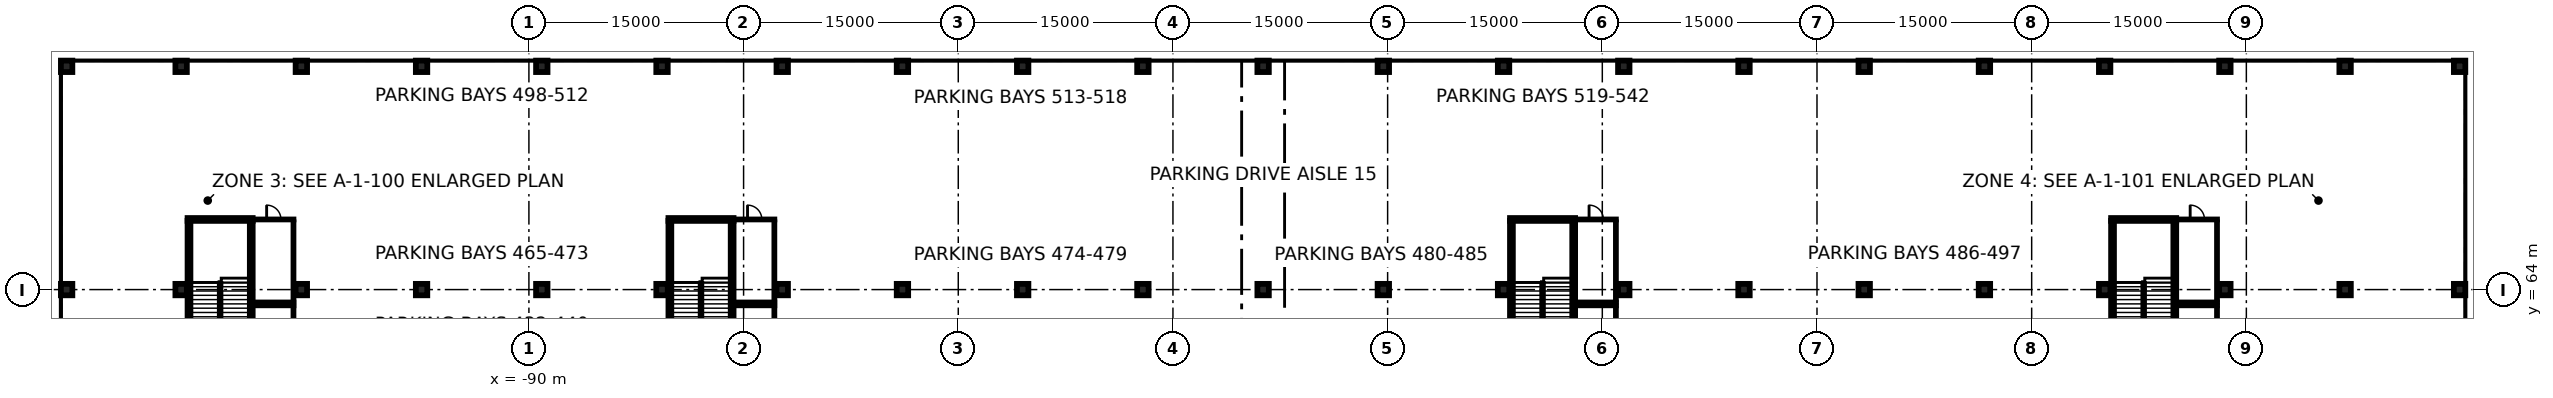
"""IFC4 building model, lengths in metres.
Left out: names, types, materials, properties, quantities, classifications, styles, units other than length and angle.
Written with IfcOpenShell. Run it as: python <this file> out.ifc"""

import sys

from ifc_helpers import new_model, si_unit, direction, frame, frame_2d, origin, origin_2d, place, context, subcontext, project, spatial, rectangle, extrude, element, fill, save


model = new_model("IFC4")
c1 = context("Model", 3, precision=1e-05, world=origin(), true_north=direction((0.0, 1.0)))
c2 = subcontext(c1, "Body", "Model", "MODEL_VIEW")
j1 = project(units=[si_unit("LENGTHUNIT", "METRE"), si_unit("PLANEANGLEUNIT", "RADIAN")], contexts=[c1])
p1 = place(None, origin())
s1 = spatial("IfcSite", under=j1, at=p1, CompositionType="ELEMENT")
p2 = place(p1, origin())
s2 = spatial("IfcBuilding", under=s1, at=p2, CompositionType="ELEMENT")
p3 = place(p2, frame((0.0, 0.0, -12.0)))
s3 = spatial("IfcBuildingStorey", under=s2, at=p3, CompositionType="ELEMENT", Elevation=-12.0)
p4 = place(p3, frame((-123.6, 80.45, 0.0), z_axis=(0.0, 0.0, 1.0), x_axis=(1.0, 0.0, 0.0)))
e1 = element("IfcWall", 1, at=p4, inside=s3, PredefinedType="USERDEFINED", context=c2, shape_type="SweptSolid", body=[
    extrude(rectangle(XDim=169.8, YDim=0.9, at=frame_2d((84.9, 0.0))), origin(), (0.0, 0.0, 1.0), 11.55),
])
for number, where, z_axis, x_axis in (
    (2, (-123.15, -80.0, 0.0), (0.0, 0.0, 1.0), (0.0, 1.0, 0.0)),
    (3, (45.75, -80.0, 0.0), (0.0, 0.0, 1.0), (0.0, 1.0, 0.0)),
):
    element("IfcWall", number, at=place(p3, frame(where, z_axis=z_axis, x_axis=x_axis)), inside=s3, PredefinedType="USERDEFINED", context=c2, shape_type="SweptSolid", body=[
        extrude(rectangle(XDim=160.0, YDim=0.9, at=frame_2d((80.0, 0.0))), origin(), (0.0, 0.0, 1.0), 11.55),
    ])
p5 = place(p2, frame((0.0, 0.0, -3.6)))
s4 = spatial("IfcBuildingStorey", under=s2, at=p5, CompositionType="ELEMENT", Elevation=-3.6)
for number, where, z_axis, x_axis in (
    (4, (-122.3, 64.0, -0.4), (0.0, 0.0, 1.0), (1.0, 0.0, 0.0)),
    (5, (-122.3, 79.6, -0.4), (0.0, 0.0, 1.0), (1.0, 0.0, 0.0)),
    (6, (-114.3, 64.0, -0.4), (0.0, 0.0, 1.0), (1.0, 0.0, 0.0)),
    (7, (-114.3, 79.6, -0.4), (0.0, 0.0, 1.0), (1.0, 0.0, 0.0)),
    (8, (-105.9, 64.0, -0.4), (0.0, 0.0, 1.0), (1.0, 0.0, 0.0)),
    (9, (-105.9, 79.6, -0.4), (0.0, 0.0, 1.0), (1.0, 0.0, 0.0)),
    (10, (-97.5, 64.0, -0.4), (0.0, 0.0, 1.0), (1.0, 0.0, 0.0)),
    (11, (-97.5, 79.6, -0.4), (0.0, 0.0, 1.0), (1.0, 0.0, 0.0)),
    (12, (-89.1, 64.0, -0.4), (0.0, 0.0, 1.0), (1.0, 0.0, 0.0)),
    (13, (-89.1, 79.6, -0.4), (0.0, 0.0, 1.0), (1.0, 0.0, 0.0)),
    (14, (-80.7, 64.0, -0.4), (0.0, 0.0, 1.0), (1.0, 0.0, 0.0)),
    (15, (-80.7, 79.6, -0.4), (0.0, 0.0, 1.0), (1.0, 0.0, 0.0)),
    (16, (-72.3, 64.0, -0.4), (0.0, 0.0, 1.0), (1.0, 0.0, 0.0)),
    (17, (-72.3, 79.6, -0.4), (0.0, 0.0, 1.0), (1.0, 0.0, 0.0)),
    (18, (-63.9, 64.0, -0.4), (0.0, 0.0, 1.0), (1.0, 0.0, 0.0)),
    (19, (-63.9, 79.6, -0.4), (0.0, 0.0, 1.0), (1.0, 0.0, 0.0)),
    (20, (-55.5, 64.0, -0.4), (0.0, 0.0, 1.0), (1.0, 0.0, 0.0)),
    (21, (-55.5, 79.6, -0.4), (0.0, 0.0, 1.0), (1.0, 0.0, 0.0)),
    (22, (-47.1, 64.0, -0.4), (0.0, 0.0, 1.0), (1.0, 0.0, 0.0)),
    (23, (-47.1, 79.6, -0.4), (0.0, 0.0, 1.0), (1.0, 0.0, 0.0)),
    (24, (-38.7, 64.0, -0.4), (0.0, 0.0, 1.0), (1.0, 0.0, 0.0)),
    (25, (-38.7, 79.6, -0.4), (0.0, 0.0, 1.0), (1.0, 0.0, 0.0)),
    (26, (-30.3, 64.0, -0.4), (0.0, 0.0, 1.0), (1.0, 0.0, 0.0)),
    (27, (-30.3, 79.6, -0.4), (0.0, 0.0, 1.0), (1.0, 0.0, 0.0)),
    (28, (-21.9, 64.0, -0.4), (0.0, 0.0, 1.0), (1.0, 0.0, 0.0)),
    (29, (-21.9, 79.6, -0.4), (0.0, 0.0, 1.0), (1.0, 0.0, 0.0)),
    (30, (-13.5, 64.0, -0.4), (0.0, 0.0, 1.0), (1.0, 0.0, 0.0)),
    (31, (-13.5, 79.6, -0.4), (0.0, 0.0, 1.0), (1.0, 0.0, 0.0)),
    (32, (-5.1, 64.0, -0.4), (0.0, 0.0, 1.0), (1.0, 0.0, 0.0)),
    (33, (-5.1, 79.6, -0.4), (0.0, 0.0, 1.0), (1.0, 0.0, 0.0)),
    (34, (3.3, 64.0, -0.4), (0.0, 0.0, 1.0), (1.0, 0.0, 0.0)),
    (35, (3.3, 79.6, -0.4), (0.0, 0.0, 1.0), (1.0, 0.0, 0.0)),
    (36, (11.7, 64.0, -0.4), (0.0, 0.0, 1.0), (1.0, 0.0, 0.0)),
    (37, (11.7, 79.6, -0.4), (0.0, 0.0, 1.0), (1.0, 0.0, 0.0)),
    (38, (20.1, 64.0, -0.4), (0.0, 0.0, 1.0), (1.0, 0.0, 0.0)),
    (39, (20.1, 79.6, -0.4), (0.0, 0.0, 1.0), (1.0, 0.0, 0.0)),
    (40, (28.5, 64.0, -0.4), (0.0, 0.0, 1.0), (1.0, 0.0, 0.0)),
    (41, (28.5, 79.6, -0.4), (0.0, 0.0, 1.0), (1.0, 0.0, 0.0)),
    (42, (36.9, 64.0, -0.4), (0.0, 0.0, 1.0), (1.0, 0.0, 0.0)),
    (43, (36.9, 79.6, -0.4), (0.0, 0.0, 1.0), (1.0, 0.0, 0.0)),
    (44, (44.9, 64.0, -0.4), (0.0, 0.0, 1.0), (1.0, 0.0, 0.0)),
    (45, (44.9, 79.6, -0.4), (0.0, 0.0, 1.0), (1.0, 0.0, 0.0)),
):
    element("IfcColumn", number, at=place(p5, frame(where, z_axis=z_axis, x_axis=x_axis)), inside=s4, PredefinedType="COLUMN", context=c2, shape_type="SweptSolid", body=[
        extrude(rectangle(XDim=0.8, YDim=0.8, at=origin_2d()), origin(), (0.0, 0.0, 1.0), 3.55),
    ])
p6 = place(p5, frame((-109.3, 62.9, 0.0), z_axis=(0.0, 0.0, 1.0), x_axis=(1.0, 0.0, 0.0)))
e46 = element("IfcWall", 46, at=p6, inside=s4, PredefinedType="PARTITIONING", context=c2, shape_type="SweptSolid", body=[
    extrude(rectangle(XDim=2.95, YDim=0.2, at=frame_2d((1.475, 0.0))), origin(), (0.0, 0.0, 1.0), 3.15),
])
p7 = place(p5, frame((-106.45, 59.2, 0.0), z_axis=(0.0, 0.0, 1.0), x_axis=(0.0, 1.0, 0.0)))
e47 = element("IfcWall", 47, at=p7, inside=s4, PredefinedType="PARTITIONING", context=c2, shape_type="SweptSolid", body=[
    extrude(rectangle(XDim=3.6, YDim=0.2, at=frame_2d((1.8, 0.0))), origin(), (0.0, 0.0, 1.0), 3.15),
])
p8 = place(p5, frame((-109.3, 63.1, 0.0), z_axis=(0.0, 0.0, 1.0), x_axis=(1.0, 0.0, 0.0)))
e48 = element("IfcWall", 48, at=p8, inside=s4, PredefinedType="PARTITIONING", context=c2, shape_type="SweptSolid", body=[
    extrude(rectangle(XDim=2.95, YDim=0.2, at=frame_2d((1.475, 0.0))), origin(), (0.0, 0.0, 1.0), 3.15),
])
p9 = place(p5, frame((-109.3, 68.9, 0.0), z_axis=(0.0, 0.0, 1.0), x_axis=(1.0, 0.0, 0.0)))
e49 = element("IfcWall", 49, at=p9, inside=s4, PredefinedType="PARTITIONING", context=c2, shape_type="SweptSolid", body=[
    extrude(rectangle(XDim=2.95, YDim=0.2, at=frame_2d((1.475, 0.0))), origin(), (0.0, 0.0, 1.0), 3.15),
])
p10 = place(p9, frame((0.975, 0.0, 0.0)))
e50 = element("IfcOpeningElement", 50, at=p10, cuts=e49, PredefinedType="OPENING", context=c2, shape_type="SweptSolid", body=[
    extrude(rectangle(XDim=1.0, YDim=2.1, at=frame_2d((0.5, 1.05))), frame((0.0, 0.11, 0.0), z_axis=(0.0, -1.0, 0.0), x_axis=(1.0, 0.0, 0.0)), (0.0, 0.0, 1.0), 0.22),
])
p11 = place(p5, frame((-106.45, 63.2, 0.0), z_axis=(0.0, 0.0, 1.0), x_axis=(0.0, 1.0, 0.0)))
e51 = element("IfcWall", 51, at=p11, inside=s4, PredefinedType="PARTITIONING", context=c2, shape_type="SweptSolid", body=[
    extrude(rectangle(XDim=5.6, YDim=0.2, at=frame_2d((2.8, 0.0))), origin(), (0.0, 0.0, 1.0), 3.15),
])
p12 = place(p5, frame((-75.7, 62.9, 0.0), z_axis=(0.0, 0.0, 1.0), x_axis=(1.0, 0.0, 0.0)))
e52 = element("IfcWall", 52, at=p12, inside=s4, PredefinedType="PARTITIONING", context=c2, shape_type="SweptSolid", body=[
    extrude(rectangle(XDim=2.95, YDim=0.2, at=frame_2d((1.475, 0.0))), origin(), (0.0, 0.0, 1.0), 3.15),
])
p13 = place(p5, frame((-72.85, 59.2, 0.0), z_axis=(0.0, 0.0, 1.0), x_axis=(0.0, 1.0, 0.0)))
e53 = element("IfcWall", 53, at=p13, inside=s4, PredefinedType="PARTITIONING", context=c2, shape_type="SweptSolid", body=[
    extrude(rectangle(XDim=3.6, YDim=0.2, at=frame_2d((1.8, 0.0))), origin(), (0.0, 0.0, 1.0), 3.15),
])
p14 = place(p5, frame((-75.7, 63.1, 0.0), z_axis=(0.0, 0.0, 1.0), x_axis=(1.0, 0.0, 0.0)))
e54 = element("IfcWall", 54, at=p14, inside=s4, PredefinedType="PARTITIONING", context=c2, shape_type="SweptSolid", body=[
    extrude(rectangle(XDim=2.95, YDim=0.2, at=frame_2d((1.475, 0.0))), origin(), (0.0, 0.0, 1.0), 3.15),
])
p15 = place(p5, frame((-75.7, 68.9, 0.0), z_axis=(0.0, 0.0, 1.0), x_axis=(1.0, 0.0, 0.0)))
e55 = element("IfcWall", 55, at=p15, inside=s4, PredefinedType="PARTITIONING", context=c2, shape_type="SweptSolid", body=[
    extrude(rectangle(XDim=2.95, YDim=0.2, at=frame_2d((1.475, 0.0))), origin(), (0.0, 0.0, 1.0), 3.15),
])
p16 = place(p15, frame((0.975, 0.0, 0.0)))
e56 = element("IfcOpeningElement", 56, at=p16, cuts=e55, PredefinedType="OPENING", context=c2, shape_type="SweptSolid", body=[
    extrude(rectangle(XDim=1.0, YDim=2.1, at=frame_2d((0.5, 1.05))), frame((0.0, 0.11, 0.0), z_axis=(0.0, -1.0, 0.0), x_axis=(1.0, 0.0, 0.0)), (0.0, 0.0, 1.0), 0.22),
])
p17 = place(p5, frame((-72.85, 63.2, 0.0), z_axis=(0.0, 0.0, 1.0), x_axis=(0.0, 1.0, 0.0)))
e57 = element("IfcWall", 57, at=p17, inside=s4, PredefinedType="PARTITIONING", context=c2, shape_type="SweptSolid", body=[
    extrude(rectangle(XDim=5.6, YDim=0.2, at=frame_2d((2.8, 0.0))), origin(), (0.0, 0.0, 1.0), 3.15),
])
p18 = place(p5, frame((-16.9, 62.9, 0.0), z_axis=(0.0, 0.0, 1.0), x_axis=(1.0, 0.0, 0.0)))
e58 = element("IfcWall", 58, at=p18, inside=s4, PredefinedType="PARTITIONING", context=c2, shape_type="SweptSolid", body=[
    extrude(rectangle(XDim=2.95, YDim=0.2, at=frame_2d((1.475, 0.0))), origin(), (0.0, 0.0, 1.0), 3.15),
])
p19 = place(p5, frame((-14.05, 59.2, 0.0), z_axis=(0.0, 0.0, 1.0), x_axis=(0.0, 1.0, 0.0)))
e59 = element("IfcWall", 59, at=p19, inside=s4, PredefinedType="PARTITIONING", context=c2, shape_type="SweptSolid", body=[
    extrude(rectangle(XDim=3.6, YDim=0.2, at=frame_2d((1.8, 0.0))), origin(), (0.0, 0.0, 1.0), 3.15),
])
p20 = place(p5, frame((-16.9, 63.1, 0.0), z_axis=(0.0, 0.0, 1.0), x_axis=(1.0, 0.0, 0.0)))
e60 = element("IfcWall", 60, at=p20, inside=s4, PredefinedType="PARTITIONING", context=c2, shape_type="SweptSolid", body=[
    extrude(rectangle(XDim=2.95, YDim=0.2, at=frame_2d((1.475, 0.0))), origin(), (0.0, 0.0, 1.0), 3.15),
])
p21 = place(p5, frame((-16.9, 68.9, 0.0), z_axis=(0.0, 0.0, 1.0), x_axis=(1.0, 0.0, 0.0)))
e61 = element("IfcWall", 61, at=p21, inside=s4, PredefinedType="PARTITIONING", context=c2, shape_type="SweptSolid", body=[
    extrude(rectangle(XDim=2.95, YDim=0.2, at=frame_2d((1.475, 0.0))), origin(), (0.0, 0.0, 1.0), 3.15),
])
p22 = place(p21, frame((0.975, 0.0, 0.0)))
e62 = element("IfcOpeningElement", 62, at=p22, cuts=e61, PredefinedType="OPENING", context=c2, shape_type="SweptSolid", body=[
    extrude(rectangle(XDim=1.0, YDim=2.1, at=frame_2d((0.5, 1.05))), frame((0.0, 0.11, 0.0), z_axis=(0.0, -1.0, 0.0), x_axis=(1.0, 0.0, 0.0)), (0.0, 0.0, 1.0), 0.22),
])
p23 = place(p5, frame((-14.05, 63.2, 0.0), z_axis=(0.0, 0.0, 1.0), x_axis=(0.0, 1.0, 0.0)))
e63 = element("IfcWall", 63, at=p23, inside=s4, PredefinedType="PARTITIONING", context=c2, shape_type="SweptSolid", body=[
    extrude(rectangle(XDim=5.6, YDim=0.2, at=frame_2d((2.8, 0.0))), origin(), (0.0, 0.0, 1.0), 3.15),
])
p24 = place(p5, frame((25.1, 62.9, 0.0), z_axis=(0.0, 0.0, 1.0), x_axis=(1.0, 0.0, 0.0)))
e64 = element("IfcWall", 64, at=p24, inside=s4, PredefinedType="PARTITIONING", context=c2, shape_type="SweptSolid", body=[
    extrude(rectangle(XDim=2.95, YDim=0.2, at=frame_2d((1.475, 0.0))), origin(), (0.0, 0.0, 1.0), 3.15),
])
p25 = place(p5, frame((27.95, 59.2, 0.0), z_axis=(0.0, 0.0, 1.0), x_axis=(0.0, 1.0, 0.0)))
e65 = element("IfcWall", 65, at=p25, inside=s4, PredefinedType="PARTITIONING", context=c2, shape_type="SweptSolid", body=[
    extrude(rectangle(XDim=3.6, YDim=0.2, at=frame_2d((1.8, 0.0))), origin(), (0.0, 0.0, 1.0), 3.15),
])
p26 = place(p5, frame((25.1, 63.1, 0.0), z_axis=(0.0, 0.0, 1.0), x_axis=(1.0, 0.0, 0.0)))
e66 = element("IfcWall", 66, at=p26, inside=s4, PredefinedType="PARTITIONING", context=c2, shape_type="SweptSolid", body=[
    extrude(rectangle(XDim=2.95, YDim=0.2, at=frame_2d((1.475, 0.0))), origin(), (0.0, 0.0, 1.0), 3.15),
])
p27 = place(p5, frame((25.1, 68.9, 0.0), z_axis=(0.0, 0.0, 1.0), x_axis=(1.0, 0.0, 0.0)))
e67 = element("IfcWall", 67, at=p27, inside=s4, PredefinedType="PARTITIONING", context=c2, shape_type="SweptSolid", body=[
    extrude(rectangle(XDim=2.95, YDim=0.2, at=frame_2d((1.475, 0.0))), origin(), (0.0, 0.0, 1.0), 3.15),
])
p28 = place(p27, frame((0.975, 0.0, 0.0)))
e68 = element("IfcOpeningElement", 68, at=p28, cuts=e67, PredefinedType="OPENING", context=c2, shape_type="SweptSolid", body=[
    extrude(rectangle(XDim=1.0, YDim=2.1, at=frame_2d((0.5, 1.05))), frame((0.0, 0.11, 0.0), z_axis=(0.0, -1.0, 0.0), x_axis=(1.0, 0.0, 0.0)), (0.0, 0.0, 1.0), 0.22),
])
p29 = place(p5, frame((27.95, 63.2, 0.0), z_axis=(0.0, 0.0, 1.0), x_axis=(0.0, 1.0, 0.0)))
e69 = element("IfcWall", 69, at=p29, inside=s4, PredefinedType="PARTITIONING", context=c2, shape_type="SweptSolid", body=[
    extrude(rectangle(XDim=5.6, YDim=0.2, at=frame_2d((2.8, 0.0))), origin(), (0.0, 0.0, 1.0), 3.15),
])
p30 = place(p5, frame((-113.75, 59.2, 0.0), z_axis=(0.0, 0.0, 1.0), x_axis=(0.0, 1.0, 0.0)))
e70 = element("IfcWall", 70, at=p30, inside=s4, PredefinedType="SOLIDWALL", context=c2, shape_type="SweptSolid", body=[
    extrude(rectangle(XDim=9.6, YDim=0.2, at=frame_2d((4.8, 0.0))), origin(), (0.0, 0.0, 1.0), 3.15),
])
p31 = place(p5, frame((-109.4, 59.2, 0.0), z_axis=(0.0, 0.0, 1.0), x_axis=(0.0, 1.0, 0.0)))
e71 = element("IfcWall", 71, at=p31, inside=s4, PredefinedType="SOLIDWALL", context=c2, shape_type="SweptSolid", body=[
    extrude(rectangle(XDim=9.6, YDim=0.2, at=frame_2d((4.8, 0.0))), origin(), (0.0, 0.0, 1.0), 3.15),
])
p32 = place(p31, frame((0.4, 0.0, 0.0)))
e72 = element("IfcOpeningElement", 72, at=p32, cuts=e71, PredefinedType="OPENING", context=c2, shape_type="SweptSolid", body=[
    extrude(rectangle(XDim=1.2, YDim=2.1, at=frame_2d((0.6, 1.05))), frame((0.0, 0.11, 0.0), z_axis=(0.0, -1.0, 0.0), x_axis=(1.0, 0.0, 0.0)), (0.0, 0.0, 1.0), 0.22),
])
p33 = place(p5, frame((-113.85, 68.9, 0.0), z_axis=(0.0, 0.0, 1.0), x_axis=(1.0, 0.0, 0.0)))
e73 = element("IfcWall", 73, at=p33, inside=s4, PredefinedType="SOLIDWALL", context=c2, shape_type="SweptSolid", body=[
    extrude(rectangle(XDim=4.55, YDim=0.2, at=frame_2d((2.275, 0.0))), origin(), (0.0, 0.0, 1.0), 3.15),
])
p34 = place(p5, frame((-80.15, 59.2, 0.0), z_axis=(0.0, 0.0, 1.0), x_axis=(0.0, 1.0, 0.0)))
e74 = element("IfcWall", 74, at=p34, inside=s4, PredefinedType="SOLIDWALL", context=c2, shape_type="SweptSolid", body=[
    extrude(rectangle(XDim=9.6, YDim=0.2, at=frame_2d((4.8, 0.0))), origin(), (0.0, 0.0, 1.0), 3.15),
])
p35 = place(p5, frame((-75.8, 59.2, 0.0), z_axis=(0.0, 0.0, 1.0), x_axis=(0.0, 1.0, 0.0)))
e75 = element("IfcWall", 75, at=p35, inside=s4, PredefinedType="SOLIDWALL", context=c2, shape_type="SweptSolid", body=[
    extrude(rectangle(XDim=9.6, YDim=0.2, at=frame_2d((4.8, 0.0))), origin(), (0.0, 0.0, 1.0), 3.15),
])
p36 = place(p35, frame((0.4, 0.0, 0.0)))
e76 = element("IfcOpeningElement", 76, at=p36, cuts=e75, PredefinedType="OPENING", context=c2, shape_type="SweptSolid", body=[
    extrude(rectangle(XDim=1.2, YDim=2.1, at=frame_2d((0.6, 1.05))), frame((0.0, 0.11, 0.0), z_axis=(0.0, -1.0, 0.0), x_axis=(1.0, 0.0, 0.0)), (0.0, 0.0, 1.0), 0.22),
])
p37 = place(p5, frame((-80.25, 68.9, 0.0), z_axis=(0.0, 0.0, 1.0), x_axis=(1.0, 0.0, 0.0)))
e77 = element("IfcWall", 77, at=p37, inside=s4, PredefinedType="SOLIDWALL", context=c2, shape_type="SweptSolid", body=[
    extrude(rectangle(XDim=4.55, YDim=0.2, at=frame_2d((2.275, 0.0))), origin(), (0.0, 0.0, 1.0), 3.15),
])
p38 = place(p5, frame((-21.35, 59.2, 0.0), z_axis=(0.0, 0.0, 1.0), x_axis=(0.0, 1.0, 0.0)))
e78 = element("IfcWall", 78, at=p38, inside=s4, PredefinedType="SOLIDWALL", context=c2, shape_type="SweptSolid", body=[
    extrude(rectangle(XDim=9.6, YDim=0.2, at=frame_2d((4.8, 0.0))), origin(), (0.0, 0.0, 1.0), 3.15),
])
p39 = place(p5, frame((-17.0, 59.2, 0.0), z_axis=(0.0, 0.0, 1.0), x_axis=(0.0, 1.0, 0.0)))
e79 = element("IfcWall", 79, at=p39, inside=s4, PredefinedType="SOLIDWALL", context=c2, shape_type="SweptSolid", body=[
    extrude(rectangle(XDim=9.6, YDim=0.2, at=frame_2d((4.8, 0.0))), origin(), (0.0, 0.0, 1.0), 3.15),
])
p40 = place(p39, frame((0.4, 0.0, 0.0)))
e80 = element("IfcOpeningElement", 80, at=p40, cuts=e79, PredefinedType="OPENING", context=c2, shape_type="SweptSolid", body=[
    extrude(rectangle(XDim=1.2, YDim=2.1, at=frame_2d((0.6, 1.05))), frame((0.0, 0.11, 0.0), z_axis=(0.0, -1.0, 0.0), x_axis=(1.0, 0.0, 0.0)), (0.0, 0.0, 1.0), 0.22),
])
p41 = place(p5, frame((-21.45, 68.9, 0.0), z_axis=(0.0, 0.0, 1.0), x_axis=(1.0, 0.0, 0.0)))
e81 = element("IfcWall", 81, at=p41, inside=s4, PredefinedType="SOLIDWALL", context=c2, shape_type="SweptSolid", body=[
    extrude(rectangle(XDim=4.55, YDim=0.2, at=frame_2d((2.275, 0.0))), origin(), (0.0, 0.0, 1.0), 3.15),
])
p42 = place(p5, frame((20.65, 59.2, 0.0), z_axis=(0.0, 0.0, 1.0), x_axis=(0.0, 1.0, 0.0)))
e82 = element("IfcWall", 82, at=p42, inside=s4, PredefinedType="SOLIDWALL", context=c2, shape_type="SweptSolid", body=[
    extrude(rectangle(XDim=9.6, YDim=0.2, at=frame_2d((4.8, 0.0))), origin(), (0.0, 0.0, 1.0), 3.15),
])
p43 = place(p5, frame((25.0, 59.2, 0.0), z_axis=(0.0, 0.0, 1.0), x_axis=(0.0, 1.0, 0.0)))
e83 = element("IfcWall", 83, at=p43, inside=s4, PredefinedType="SOLIDWALL", context=c2, shape_type="SweptSolid", body=[
    extrude(rectangle(XDim=9.6, YDim=0.2, at=frame_2d((4.8, 0.0))), origin(), (0.0, 0.0, 1.0), 3.15),
])
p44 = place(p43, frame((0.4, 0.0, 0.0)))
e84 = element("IfcOpeningElement", 84, at=p44, cuts=e83, PredefinedType="OPENING", context=c2, shape_type="SweptSolid", body=[
    extrude(rectangle(XDim=1.2, YDim=2.1, at=frame_2d((0.6, 1.05))), frame((0.0, 0.11, 0.0), z_axis=(0.0, -1.0, 0.0), x_axis=(1.0, 0.0, 0.0)), (0.0, 0.0, 1.0), 0.22),
])
p45 = place(p5, frame((20.55, 68.9, 0.0), z_axis=(0.0, 0.0, 1.0), x_axis=(1.0, 0.0, 0.0)))
e85 = element("IfcWall", 85, at=p45, inside=s4, PredefinedType="SOLIDWALL", context=c2, shape_type="SweptSolid", body=[
    extrude(rectangle(XDim=4.55, YDim=0.2, at=frame_2d((2.275, 0.0))), origin(), (0.0, 0.0, 1.0), 3.15),
])
p46 = place(p10, origin())
e86 = element("IfcDoor", 86, at=p46, inside=s4, OperationType="SINGLE_SWING_LEFT", PredefinedType="DOOR", context=c2, shape_type="SweptSolid", body=[
    extrude(rectangle(XDim=1.0, YDim=2.1, at=frame_2d((0.5, 1.05))), frame((0.0, 0.025, 0.0), z_axis=(0.0, -1.0, 0.0), x_axis=(1.0, 0.0, 0.0)), (0.0, 0.0, 1.0), 0.05),
])
fill(e50, e86)
p47 = place(p16, origin())
e87 = element("IfcDoor", 87, at=p47, inside=s4, OperationType="SINGLE_SWING_LEFT", PredefinedType="DOOR", context=c2, shape_type="SweptSolid", body=[
    extrude(rectangle(XDim=1.0, YDim=2.1, at=frame_2d((0.5, 1.05))), frame((0.0, 0.025, 0.0), z_axis=(0.0, -1.0, 0.0), x_axis=(1.0, 0.0, 0.0)), (0.0, 0.0, 1.0), 0.05),
])
fill(e56, e87)
p48 = place(p22, origin())
e88 = element("IfcDoor", 88, at=p48, inside=s4, OperationType="SINGLE_SWING_LEFT", PredefinedType="DOOR", context=c2, shape_type="SweptSolid", body=[
    extrude(rectangle(XDim=1.0, YDim=2.1, at=frame_2d((0.5, 1.05))), frame((0.0, 0.025, 0.0), z_axis=(0.0, -1.0, 0.0), x_axis=(1.0, 0.0, 0.0)), (0.0, 0.0, 1.0), 0.05),
])
fill(e62, e88)
p49 = place(p28, origin())
e89 = element("IfcDoor", 89, at=p49, inside=s4, OperationType="SINGLE_SWING_LEFT", PredefinedType="DOOR", context=c2, shape_type="SweptSolid", body=[
    extrude(rectangle(XDim=1.0, YDim=2.1, at=frame_2d((0.5, 1.05))), frame((0.0, 0.025, 0.0), z_axis=(0.0, -1.0, 0.0), x_axis=(1.0, 0.0, 0.0)), (0.0, 0.0, 1.0), 0.05),
])
fill(e68, e89)
save(model, sys.argv[1])
